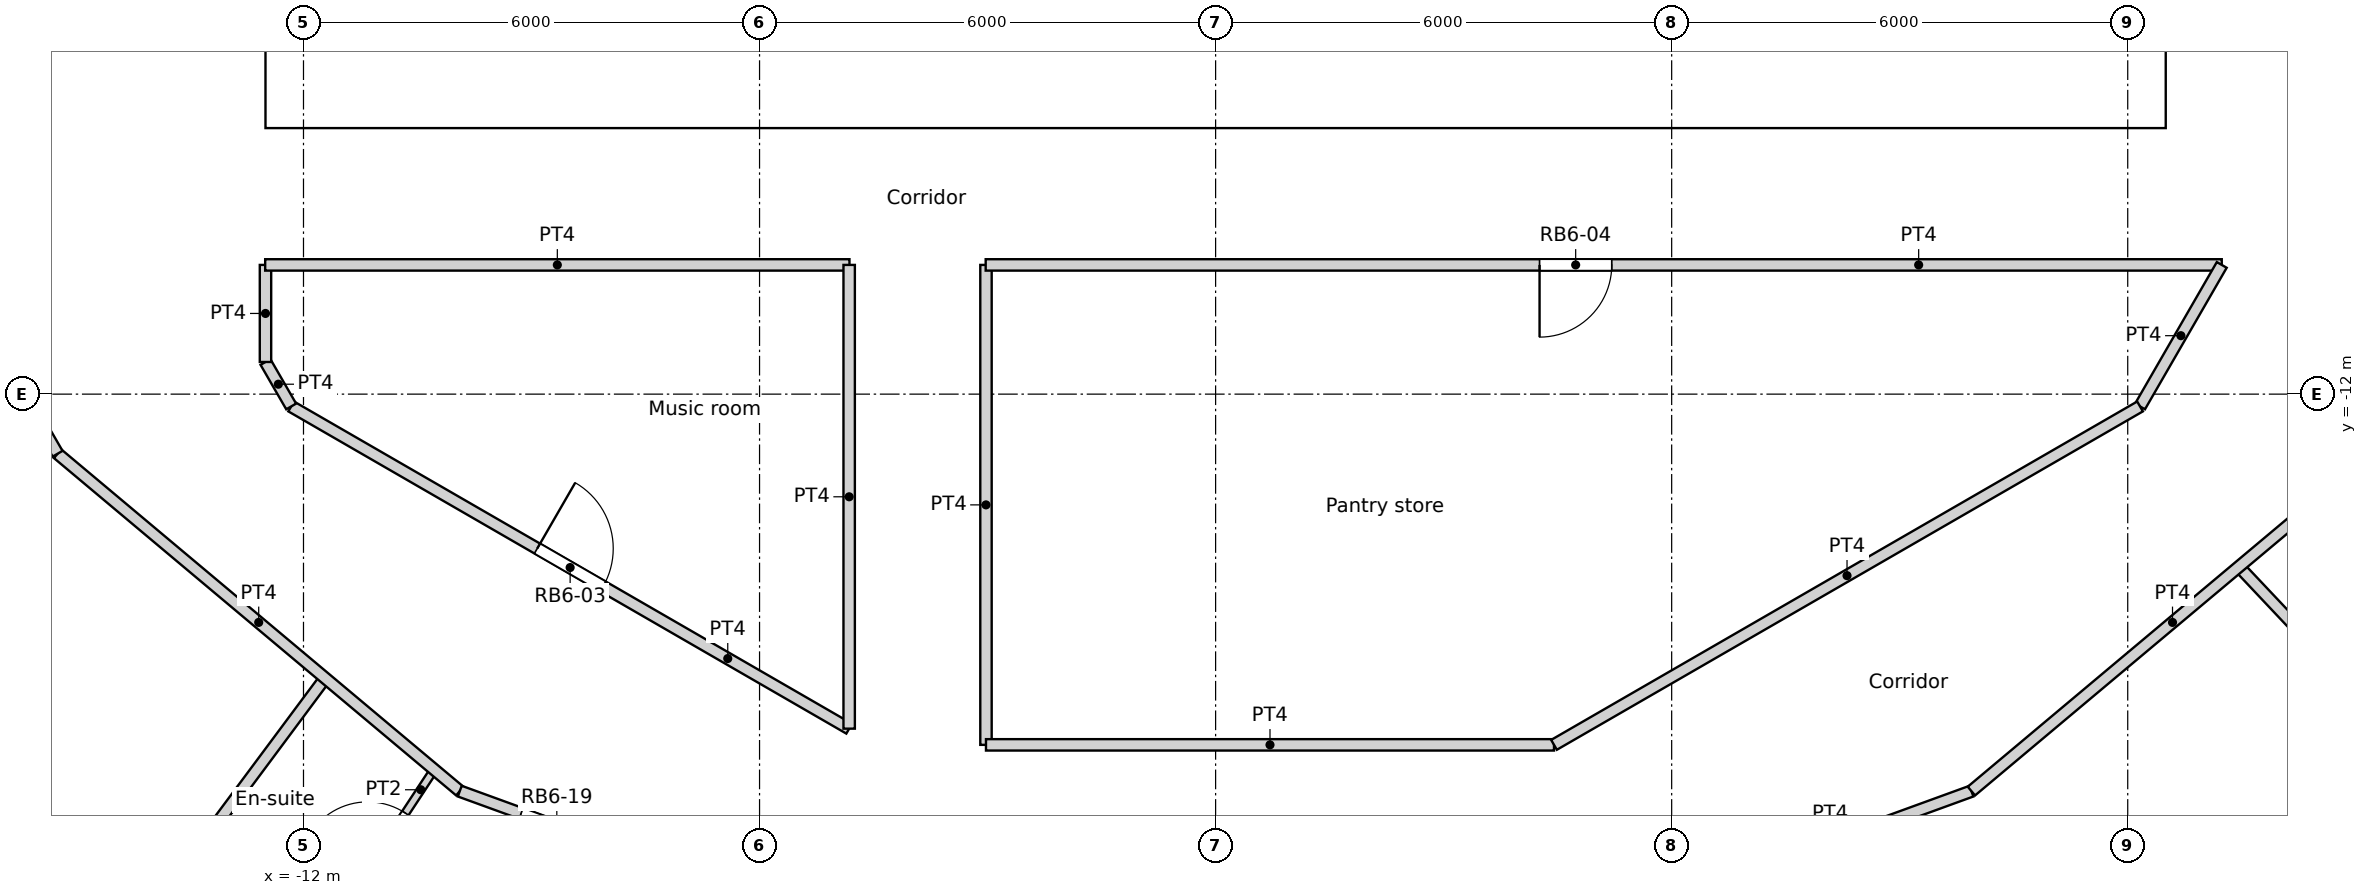
"""IFC4 building model, lengths in metres.
Left out: names, types, materials, properties, quantities, classifications, styles, units other than length and angle.
Written with IfcOpenShell. Run it as: python <this file> out.ifc"""

import sys

from ifc_helpers import new_model, si_unit, direction, frame, frame_2d, origin, origin_2d, place, context, subcontext, project, spatial, rectangle, circle, extrude, element, fill, save


model = new_model("IFC4")
c1 = context("Model", 3, precision=1e-05, world=origin(), true_north=direction((0.0, 1.0)))
c2 = subcontext(c1, "Body", "Model", "MODEL_VIEW")
j1 = project(units=[si_unit("LENGTHUNIT", "METRE"), si_unit("PLANEANGLEUNIT", "RADIAN")], contexts=[c1])
p1 = place(None, origin())
s1 = spatial("IfcSite", under=j1, at=p1, CompositionType="ELEMENT")
p2 = place(p1, origin())
s2 = spatial("IfcBuilding", under=s1, at=p2, CompositionType="ELEMENT")
p3 = place(p2, frame((0.0, 0.0, 180.0)))
s3 = spatial("IfcBuildingStorey", under=s2, at=p3, CompositionType="ELEMENT", Elevation=180.0)
for number, where, z_axis, x_axis in (
    (1, (-13.798, -12.802, 0.0), (0.0, 0.0, 1.0), (1.0, 0.0, 0.0)),
    (2, (-9.411, -16.301, 0.0), (0.0, 0.0, 1.0), (1.0, 0.0, 0.0)),
    (3, (6.876, -17.521, 0.0), (0.0, 0.0, 1.0), (1.0, 0.0, 0.0)),
    (4, (11.735, -14.716, 0.0), (0.0, 0.0, 1.0), (1.0, 0.0, 0.0)),
):
    element("IfcColumn", number, at=place(p3, frame(where, z_axis=z_axis, x_axis=x_axis)), inside=s3, PredefinedType="COLUMN", context=c2, shape_type="SweptSolid", body=[
        extrude(circle(Radius=0.65, at=origin_2d()), origin(), (0.0, 0.0, 1.0), 3.6),
    ])
p4 = place(p3, frame((-12.5, -8.05, 0.0), z_axis=(0.0, 0.0, 1.0), x_axis=(1.0, 0.0, 0.0)))
e5 = element("IfcWall", 5, at=p4, inside=s3, PredefinedType="SOLIDWALL", context=c2, shape_type="SweptSolid", body=[
    extrude(rectangle(XDim=25.0, YDim=0.9, at=frame_2d((12.5, 0.0))), origin(), (0.0, 0.0, 1.0), 3.6),
])
p5 = place(p4, frame((13.4, 0.0, 0.0)))
e6 = element("IfcOpeningElement", 6, at=p5, cuts=e5, PredefinedType="OPENING", context=c2, shape_type="SweptSolid", body=[
    extrude(rectangle(XDim=1.0, YDim=2.1, at=frame_2d((0.5, 1.05))), frame((0.0, 0.45, 0.0), z_axis=(0.0, -1.0, 0.0), x_axis=(1.0, 0.0, 0.0)), (0.0, 0.0, 1.0), 0.9),
])
p6 = place(p4, frame((8.3, 0.0, 0.0)))
e7 = element("IfcOpeningElement", 7, at=p6, cuts=e5, PredefinedType="OPENING", context=c2, shape_type="SweptSolid", body=[
    extrude(rectangle(XDim=1.8, YDim=2.1, at=frame_2d((0.9, 1.05))), frame((0.0, 0.45, 0.0), z_axis=(0.0, -1.0, 0.0), x_axis=(1.0, 0.0, 0.0)), (0.0, 0.0, 1.0), 0.9),
])
p7 = place(p4, frame((14.9, 0.0, 0.0)))
e8 = element("IfcOpeningElement", 8, at=p7, cuts=e5, PredefinedType="OPENING", context=c2, shape_type="SweptSolid", body=[
    extrude(rectangle(XDim=1.8, YDim=2.1, at=frame_2d((0.9, 1.05))), frame((0.0, 0.45, 0.0), z_axis=(0.0, -1.0, 0.0), x_axis=(1.0, 0.0, 0.0)), (0.0, 0.0, 1.0), 0.9),
])
p8 = place(p3, frame((-12.05, -7.6, 0.0), z_axis=(0.0, 0.0, 1.0), x_axis=(0.0, 1.0, 0.0)))
e9 = element("IfcWall", 9, at=p8, inside=s3, PredefinedType="SOLIDWALL", context=c2, shape_type="SweptSolid", body=[
    extrude(rectangle(XDim=15.2, YDim=0.9, at=frame_2d((7.6, 0.0))), origin(), (0.0, 0.0, 1.0), 3.6),
])
p9 = place(p8, frame((7.1, 0.0, 0.0)))
e10 = element("IfcOpeningElement", 10, at=p9, cuts=e9, PredefinedType="OPENING", context=c2, shape_type="SweptSolid", body=[
    extrude(rectangle(XDim=1.0, YDim=2.1, at=frame_2d((0.5, 1.05))), frame((0.0, 0.45, 0.0), z_axis=(0.0, -1.0, 0.0), x_axis=(1.0, 0.0, 0.0)), (0.0, 0.0, 1.0), 0.9),
])
p10 = place(p3, frame((12.05, -7.6, 0.0), z_axis=(0.0, 0.0, 1.0), x_axis=(0.0, 1.0, 0.0)))
e11 = element("IfcWall", 11, at=p10, inside=s3, PredefinedType="SOLIDWALL", context=c2, shape_type="SweptSolid", body=[
    extrude(rectangle(XDim=15.2, YDim=0.9, at=frame_2d((7.6, 0.0))), origin(), (0.0, 0.0, 1.0), 3.6),
])
p11 = place(p10, frame((5.1, 0.0, 0.0)))
e12 = element("IfcOpeningElement", 12, at=p11, cuts=e11, PredefinedType="OPENING", context=c2, shape_type="SweptSolid", body=[
    extrude(rectangle(XDim=1.0, YDim=2.1, at=frame_2d((0.5, 1.05))), frame((0.0, 0.45, 0.0), z_axis=(0.0, -1.0, 0.0), x_axis=(1.0, 0.0, 0.0)), (0.0, 0.0, 1.0), 0.9),
])
for number, where, z_axis, x_axis in (
    (13, (0.55, -7.6, 0.0), (0.0, 0.0, 1.0), (0.0, 1.0, 0.0)),
    (14, (2.25, -7.6, 0.0), (0.0, 0.0, 1.0), (0.0, 1.0, 0.0)),
):
    element("IfcWall", number, at=place(p3, frame(where, z_axis=z_axis, x_axis=x_axis)), inside=s3, PredefinedType="SOLIDWALL", context=c2, shape_type="SweptSolid", body=[
        extrude(rectangle(XDim=4.35, YDim=0.3, at=frame_2d((2.175, 0.0))), origin(), (0.0, 0.0, 1.0), 3.3),
    ])
p12 = place(p3, frame((-9.05, -7.15, 0.0), z_axis=(0.0, 0.0, 1.0), x_axis=(1.0, 0.0, 0.0)))
e15 = element("IfcWall", 15, at=p12, inside=s3, PredefinedType="SOLIDWALL", context=c2, shape_type="SweptSolid", body=[
    extrude(rectangle(XDim=4.85, YDim=0.9, at=frame_2d((2.425, 0.0))), origin(), (0.0, 0.0, 1.0), 3.3),
])
p13 = place(p3, frame((-2.4, -7.15, 0.0), z_axis=(0.0, 0.0, 1.0), x_axis=(1.0, 0.0, 0.0)))
e16 = element("IfcWall", 16, at=p13, inside=s3, PredefinedType="SOLIDWALL", context=c2, shape_type="SweptSolid", body=[
    extrude(rectangle(XDim=2.8, YDim=0.9, at=frame_2d((1.4, 0.0))), origin(), (0.0, 0.0, 1.0), 3.3),
])
p14 = place(p3, frame((4.2, -7.15, 0.0), z_axis=(0.0, 0.0, 1.0), x_axis=(1.0, 0.0, 0.0)))
e17 = element("IfcWall", 17, at=p14, inside=s3, PredefinedType="SOLIDWALL", context=c2, shape_type="SweptSolid", body=[
    extrude(rectangle(XDim=4.85, YDim=0.9, at=frame_2d((2.425, 0.0))), origin(), (0.0, 0.0, 1.0), 3.3),
])
p15 = place(p3, frame((-12.504, -10.3, 0.0), z_axis=(0.0, 0.0, 1.0), x_axis=(1.0, 0.0, 0.0)))
e18 = element("IfcWall", 18, at=p15, inside=s3, PredefinedType="PARTITIONING", context=c2, shape_type="SweptSolid", body=[
    extrude(rectangle(XDim=7.687, YDim=0.15, at=frame_2d((3.844, 0.0))), origin(), (0.0, 0.0, 1.0), 3.3),
])
p16 = place(p3, frame((-3.025, -10.3, 0.0), z_axis=(0.0, 0.0, 1.0), x_axis=(1.0, 0.0, 0.0)))
e19 = element("IfcWall", 19, at=p16, inside=s3, PredefinedType="PARTITIONING", context=c2, shape_type="SweptSolid", body=[
    extrude(rectangle(XDim=16.262, YDim=0.15, at=frame_2d((8.131, 0.0))), origin(), (0.0, 0.0, 1.0), 3.3),
])
p17 = place(p16, frame((7.287, 0.0, 0.0)))
e20 = element("IfcOpeningElement", 20, at=p17, cuts=e19, PredefinedType="OPENING", context=c2, shape_type="SweptSolid", body=[
    extrude(rectangle(XDim=0.95, YDim=2.1, at=frame_2d((0.475, 1.05))), frame((0.0, 0.075, 0.0), z_axis=(0.0, -1.0, 0.0), x_axis=(1.0, 0.0, 0.0)), (0.0, 0.0, 1.0), 0.15),
])
p18 = place(p3, frame((12.162, -12.162, 0.0), z_axis=(0.0, 0.0, 1.0), x_axis=(0.499961633463, 0.866047553582, 0.0)))
e21 = element("IfcWall", 21, at=p18, inside=s3, PredefinedType="PARTITIONING", context=c2, shape_type="SweptSolid", body=[
    extrude(rectangle(XDim=2.15, YDim=0.15, at=frame_2d((1.075, 0.0))), origin(), (0.0, 0.0, 1.0), 3.3),
])
p19 = place(p3, frame((9.943, -17.222, 0.0), z_axis=(0.0, 0.0, 1.0), x_axis=(0.766192104565, 0.642611592567, 0.0)))
e22 = element("IfcWall", 22, at=p19, inside=s3, PredefinedType="PARTITIONING", context=c2, shape_type="SweptSolid", body=[
    extrude(rectangle(XDim=6.906, YDim=0.15, at=frame_2d((3.453, 0.0))), origin(), (0.0, 0.0, 1.0), 3.3),
])
p20 = place(p3, frame((-12.5, -11.577, 0.0), z_axis=(0.0, 0.0, 1.0), x_axis=(0.0, 1.0, 0.0)))
e23 = element("IfcWall", 23, at=p20, inside=s3, PredefinedType="PARTITIONING", context=c2, shape_type="SweptSolid", body=[
    extrude(rectangle(XDim=1.277, YDim=0.15, at=frame_2d((0.638, 0.0))), origin(), (0.0, 0.0, 1.0), 3.3),
])
p21 = place(p3, frame((-12.5, -11.577, 0.0), z_axis=(0.0, 0.0, 1.0), x_axis=(0.500024767483, -0.866011103799, 0.0)))
e24 = element("IfcWall", 24, at=p21, inside=s3, PredefinedType="PARTITIONING", context=c2, shape_type="SweptSolid", body=[
    extrude(rectangle(XDim=0.676, YDim=0.15, at=frame_2d((0.338, 0.0))), origin(), (0.0, 0.0, 1.0), 3.3),
])
p22 = place(p3, frame((-15.235, -12.784, 0.0), z_axis=(0.0, 0.0, 1.0), x_axis=(0.766192104565, -0.642611592567, 0.0)))
e25 = element("IfcWall", 25, at=p22, inside=s3, PredefinedType="PARTITIONING", context=c2, shape_type="SweptSolid", body=[
    extrude(rectangle(XDim=6.906, YDim=0.15, at=frame_2d((3.453, 0.0))), origin(), (0.0, 0.0, 1.0), 3.3),
])
p23 = place(p3, frame((-18.688, -6.802, 0.0), z_axis=(0.0, 0.0, 1.0), x_axis=(0.499914202267, -0.866074933462, 0.0)))
e26 = element("IfcWall", 26, at=p23, inside=s3, PredefinedType="PARTITIONING", context=c2, shape_type="SweptSolid", body=[
    extrude(rectangle(XDim=6.907, YDim=0.15, at=frame_2d((3.454, 0.0))), origin(), (0.0, 0.0, 1.0), 3.3),
])
p24 = place(p23, frame((3.003, 0.0, 0.0)))
e27 = element("IfcOpeningElement", 27, at=p24, cuts=e26, PredefinedType="OPENING", context=c2, shape_type="SweptSolid", body=[
    extrude(rectangle(XDim=1.0, YDim=2.04, at=frame_2d((0.5, 1.02))), frame((0.0, 0.075, 0.0), z_axis=(0.0, -1.0, 0.0), x_axis=(1.0, 0.0, 0.0)), (0.0, 0.0, 1.0), 0.15),
])
p25 = place(p3, frame((-12.162, -12.162, 0.0), z_axis=(0.0, 0.0, 1.0), x_axis=(0.866004766557, -0.500035743023, 0.0)))
e28 = element("IfcWall", 28, at=p25, inside=s3, PredefinedType="PARTITIONING", context=c2, shape_type="SweptSolid", body=[
    extrude(rectangle(XDim=8.477, YDim=0.15, at=frame_2d((4.239, 0.0))), origin(), (0.0, 0.0, 1.0), 3.3),
])
p26 = place(p25, frame((3.738, 0.0, 0.0)))
e29 = element("IfcOpeningElement", 29, at=p26, cuts=e28, PredefinedType="OPENING", context=c2, shape_type="SweptSolid", body=[
    extrude(rectangle(XDim=1.0, YDim=2.04, at=frame_2d((0.5, 1.02))), frame((0.0, 0.075, 0.0), z_axis=(0.0, -1.0, 0.0), x_axis=(1.0, 0.0, 0.0)), (0.0, 0.0, 1.0), 0.15),
])
p27 = place(p3, frame((-4.821, -16.401, 0.0), z_axis=(0.0, 0.0, 1.0), x_axis=(0.0, 1.0, 0.0)))
e30 = element("IfcWall", 30, at=p27, inside=s3, PredefinedType="PARTITIONING", context=c2, shape_type="SweptSolid", body=[
    extrude(rectangle(XDim=6.101, YDim=0.15, at=frame_2d((3.05, 0.0))), origin(), (0.0, 0.0, 1.0), 3.3),
])
p28 = place(p3, frame((-3.021, -16.614, 0.0), z_axis=(0.0, 0.0, 1.0), x_axis=(0.0, 1.0, 0.0)))
e31 = element("IfcWall", 31, at=p28, inside=s3, PredefinedType="PARTITIONING", context=c2, shape_type="SweptSolid", body=[
    extrude(rectangle(XDim=6.314, YDim=0.15, at=frame_2d((3.157, 0.0))), origin(), (0.0, 0.0, 1.0), 3.3),
])
p29 = place(p3, frame((-3.021, -16.614, 0.0), z_axis=(0.0, 0.0, 1.0), x_axis=(1.0, 0.0, 0.0)))
e32 = element("IfcWall", 32, at=p29, inside=s3, PredefinedType="PARTITIONING", context=c2, shape_type="SweptSolid", body=[
    extrude(rectangle(XDim=7.473, YDim=0.15, at=frame_2d((3.736, 0.0))), origin(), (0.0, 0.0, 1.0), 3.3),
])
p30 = place(p3, frame((4.452, -16.614, 0.0), z_axis=(0.0, 0.0, 1.0), x_axis=(0.866005203721, 0.500034985904, 0.0)))
e33 = element("IfcWall", 33, at=p30, inside=s3, PredefinedType="PARTITIONING", context=c2, shape_type="SweptSolid", body=[
    extrude(rectangle(XDim=8.903, YDim=0.15, at=frame_2d((4.452, 0.0))), origin(), (0.0, 0.0, 1.0), 3.3),
])
p31 = place(p3, frame((-9.944, -17.223, 0.0), z_axis=(0.0, 0.0, 1.0), x_axis=(0.939737689664, -0.341896292208, 0.0)))
e34 = element("IfcWall", 34, at=p31, inside=s3, PredefinedType="PARTITIONING", context=c2, shape_type="SweptSolid", body=[
    extrude(rectangle(XDim=6.908, YDim=0.15, at=frame_2d((3.454, 0.0))), origin(), (0.0, 0.0, 1.0), 3.3),
])
p32 = place(p31, frame((0.859, 0.0, 0.0)))
e35 = element("IfcOpeningElement", 35, at=p32, cuts=e34, PredefinedType="OPENING", context=c2, shape_type="SweptSolid", body=[
    extrude(rectangle(XDim=1.0, YDim=2.1, at=frame_2d((0.5, 1.05))), frame((0.0, 0.075, 0.0), z_axis=(0.0, -1.0, 0.0), x_axis=(1.0, 0.0, 0.0)), (0.0, 0.0, 1.0), 0.15),
])
p33 = place(p31, frame((3.167, 0.0, 0.0)))
e36 = element("IfcOpeningElement", 36, at=p33, cuts=e34, PredefinedType="OPENING", context=c2, shape_type="SweptSolid", body=[
    extrude(rectangle(XDim=1.0, YDim=2.1, at=frame_2d((0.5, 1.05))), frame((0.0, 0.075, 0.0), z_axis=(0.0, -1.0, 0.0), x_axis=(1.0, 0.0, 0.0)), (0.0, 0.0, 1.0), 0.15),
])
p34 = place(p3, frame((3.453, -19.586, 0.0), z_axis=(0.0, 0.0, 1.0), x_axis=(0.939672634566, 0.342075050021, 0.0)))
e37 = element("IfcWall", 37, at=p34, inside=s3, PredefinedType="PARTITIONING", context=c2, shape_type="SweptSolid", body=[
    extrude(rectangle(XDim=6.908, YDim=0.15, at=frame_2d((3.454, 0.0))), origin(), (0.0, 0.0, 1.0), 3.3),
])
p35 = place(p34, frame((1.904, 0.0, 0.0)))
e38 = element("IfcOpeningElement", 38, at=p35, cuts=e37, PredefinedType="OPENING", context=c2, shape_type="SweptSolid", body=[
    extrude(rectangle(XDim=1.0, YDim=2.04, at=frame_2d((0.5, 1.02))), frame((0.0, 0.075, 0.0), z_axis=(0.0, -1.0, 0.0), x_axis=(1.0, 0.0, 0.0)), (0.0, 0.0, 1.0), 0.15),
])
p36 = place(p3, frame((-15.226, -20.452, 0.0), z_axis=(0.0, 0.0, 1.0), x_axis=(0.597131981171, 0.802143002876, 0.0)))
e39 = element("IfcWall", 39, at=p36, inside=s3, PredefinedType="PARTITIONING", context=c2, shape_type="SweptSolid", body=[
    extrude(rectangle(XDim=5.878, YDim=0.15, at=frame_2d((2.939, 0.0))), origin(), (0.0, 0.0, 1.0), 3.3),
])
p37 = place(p3, frame((-11.531, -18.837, 0.0), z_axis=(0.0, 0.0, 1.0), x_axis=(0.549730960803, 0.83534176882, 0.0)))
e40 = element("IfcWall", 40, at=p37, inside=s3, PredefinedType="PARTITIONING", context=c2, shape_type="SweptSolid", body=[
    extrude(rectangle(XDim=2.272, YDim=0.1, at=frame_2d((1.136, 0.0))), origin(), (0.0, 0.0, 1.0), 3.3),
])
p38 = place(p37, frame((0.686, 0.0, 0.0)))
e41 = element("IfcOpeningElement", 41, at=p38, cuts=e40, PredefinedType="OPENING", context=c2, shape_type="SweptSolid", body=[
    extrude(rectangle(XDim=0.9, YDim=2.04, at=frame_2d((0.45, 1.02))), frame((0.0, 0.05, 0.0), z_axis=(0.0, -1.0, 0.0), x_axis=(1.0, 0.0, 0.0)), (0.0, 0.0, 1.0), 0.1),
])
p39 = place(p3, frame((13.463, -14.27, 0.0), z_axis=(0.0, 0.0, 1.0), x_axis=(0.6862502776, -0.72736549031, 0.0)))
e42 = element("IfcWall", 42, at=p39, inside=s3, PredefinedType="PARTITIONING", context=c2, shape_type="SweptSolid", body=[
    extrude(rectangle(XDim=5.879, YDim=0.15, at=frame_2d((2.939, 0.0))), origin(), (0.0, 0.0, 1.0), 3.3),
])
p40 = place(p5, origin())
e43 = element("IfcDoor", 43, at=p40, inside=s3, OperationType="SINGLE_SWING_LEFT", PredefinedType="DOOR", context=c2, shape_type="SweptSolid", body=[
    extrude(rectangle(XDim=1.0, YDim=2.1, at=frame_2d((0.5, 1.05))), frame((0.0, 0.025, 0.0), z_axis=(0.0, -1.0, 0.0), x_axis=(1.0, 0.0, 0.0)), (0.0, 0.0, 1.0), 0.05),
])
fill(e6, e43)
p41 = place(p6, origin())
e44 = element("IfcDoor", 44, at=p41, inside=s3, OperationType="DOUBLE_DOOR_SINGLE_SWING", PredefinedType="DOOR", context=c2, shape_type="SweptSolid", body=[
    extrude(rectangle(XDim=1.8, YDim=2.1, at=frame_2d((0.9, 1.05))), frame((0.0, 0.025, 0.0), z_axis=(0.0, -1.0, 0.0), x_axis=(1.0, 0.0, 0.0)), (0.0, 0.0, 1.0), 0.05),
])
fill(e7, e44)
p42 = place(p7, origin())
e45 = element("IfcDoor", 45, at=p42, inside=s3, OperationType="DOUBLE_DOOR_SINGLE_SWING", PredefinedType="DOOR", context=c2, shape_type="SweptSolid", body=[
    extrude(rectangle(XDim=1.8, YDim=2.1, at=frame_2d((0.9, 1.05))), frame((0.0, 0.025, 0.0), z_axis=(0.0, -1.0, 0.0), x_axis=(1.0, 0.0, 0.0)), (0.0, 0.0, 1.0), 0.05),
])
fill(e8, e45)
p43 = place(p26, origin())
e46 = element("IfcDoor", 46, at=p43, inside=s3, OperationType="SINGLE_SWING_LEFT", PredefinedType="DOOR", context=c2, shape_type="SweptSolid", body=[
    extrude(rectangle(XDim=1.0, YDim=2.04, at=frame_2d((0.5, 1.02))), frame((0.0, 0.025, 0.0), z_axis=(0.0, -1.0, 0.0), x_axis=(1.0, 0.0, 0.0)), (0.0, 0.0, 1.0), 0.05),
])
fill(e29, e46)
p44 = place(p17, origin())
e47 = element("IfcDoor", 47, at=p44, inside=s3, OperationType="SINGLE_SWING_RIGHT", PredefinedType="DOOR", context=c2, shape_type="SweptSolid", body=[
    extrude(rectangle(XDim=0.95, YDim=2.1, at=frame_2d((0.475, 1.05))), frame((0.0, 0.025, 0.0), z_axis=(0.0, -1.0, 0.0), x_axis=(1.0, 0.0, 0.0)), (0.0, 0.0, 1.0), 0.05),
])
fill(e20, e47)
p45 = place(p38, origin())
e48 = element("IfcDoor", 48, at=p45, inside=s3, OperationType="SINGLE_SWING_LEFT", PredefinedType="DOOR", context=c2, shape_type="SweptSolid", body=[
    extrude(rectangle(XDim=0.9, YDim=2.04, at=frame_2d((0.45, 1.02))), frame((0.0, 0.025, 0.0), z_axis=(0.0, -1.0, 0.0), x_axis=(1.0, 0.0, 0.0)), (0.0, 0.0, 1.0), 0.05),
])
fill(e41, e48)
p46 = place(p32, origin())
e49 = element("IfcDoor", 49, at=p46, inside=s3, OperationType="SINGLE_SWING_LEFT", PredefinedType="DOOR", context=c2, shape_type="SweptSolid", body=[
    extrude(rectangle(XDim=1.0, YDim=2.1, at=frame_2d((0.5, 1.05))), frame((0.0, 0.025, 0.0), z_axis=(0.0, -1.0, 0.0), x_axis=(1.0, 0.0, 0.0)), (0.0, 0.0, 1.0), 0.05),
])
fill(e35, e49)
save(model, sys.argv[1])
